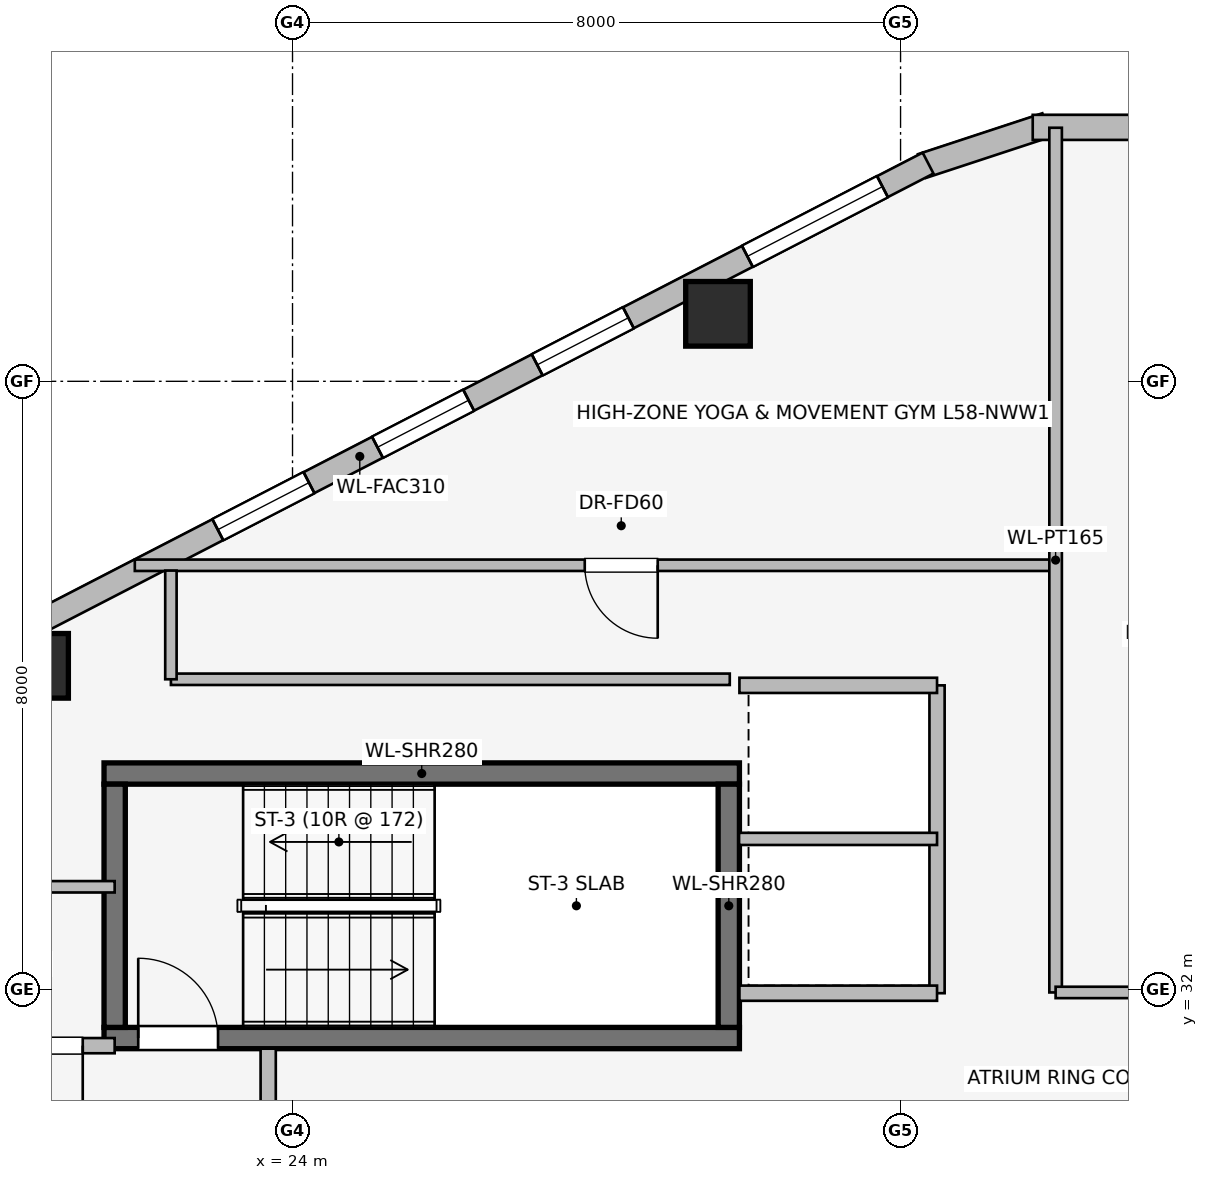
"""IFC4 building model, lengths in metres.
Left out: names, types, materials, properties, quantities, classifications, styles, units other than length and angle.
Written with IfcOpenShell. Run it as: python <this file> out.ifc"""

import sys

from ifc_helpers import new_model, si_unit, direction, frame, frame_2d, origin, origin_2d, place, context, subcontext, project, spatial, rectangle, extrude, element, fill, save


model = new_model("IFC4")
c1 = context("Model", 3, precision=1e-05, world=origin(), true_north=direction((0.0, 1.0)))
c2 = subcontext(c1, "Body", "Model", "MODEL_VIEW")
j1 = project(units=[si_unit("LENGTHUNIT", "METRE"), si_unit("PLANEANGLEUNIT", "RADIAN")], contexts=[c1])
p1 = place(None, origin())
s1 = spatial("IfcSite", under=j1, at=p1, CompositionType="ELEMENT")
p2 = place(p1, origin())
s2 = spatial("IfcBuilding", under=s1, at=p2, CompositionType="ELEMENT")
p3 = place(p2, frame((0.0, 0.0, 213.7)))
s3 = spatial("IfcBuildingStorey", under=s2, at=p3, CompositionType="ELEMENT", Elevation=213.7)
p4 = place(p3, frame((21.52, 31.36, 0.0), z_axis=(0.0, 0.0, 1.0), x_axis=(1.0, 0.0, 0.0)))
e1 = element("IfcWall", 1, at=p4, inside=s3, PredefinedType="SHEAR", context=c2, shape_type="SweptSolid", body=[
    extrude(rectangle(XDim=8.36, YDim=0.28, at=frame_2d((4.18, 0.0))), origin(), (0.0, 0.0, 1.0), 3.45),
])
p5 = place(p4, frame((0.45, 0.0, 0.0)))
e2 = element("IfcOpeningElement", 2, at=p5, cuts=e1, PredefinedType="OPENING", context=c2, shape_type="SweptSolid", body=[
    extrude(rectangle(XDim=1.05, YDim=2.0, at=frame_2d((0.525, 1.0))), frame((0.0, 0.15, 0.0), z_axis=(0.0, -1.0, 0.0), x_axis=(1.0, 0.0, 0.0)), (0.0, 0.0, 1.0), 0.3),
])
p6 = place(p3, frame((29.88, 34.84, 0.0), z_axis=(0.0, 0.0, 1.0), x_axis=(-1.0, 0.0, 0.0)))
e3 = element("IfcWall", 3, at=p6, inside=s3, PredefinedType="SHEAR", context=c2, shape_type="SweptSolid", body=[
    extrude(rectangle(XDim=8.36, YDim=0.28, at=frame_2d((4.18, 0.0))), origin(), (0.0, 0.0, 1.0), 3.45),
])
for number, where, z_axis, x_axis in (
    (4, (21.66, 34.7, 0.0), (0.0, 0.0, 1.0), (0.0, -1.0, 0.0)),
    (5, (29.74, 31.5, 0.0), (0.0, 0.0, 1.0), (0.0, 1.0, 0.0)),
):
    element("IfcWall", number, at=place(p3, frame(where, z_axis=z_axis, x_axis=x_axis)), inside=s3, PredefinedType="SHEAR", context=c2, shape_type="SweptSolid", body=[
        extrude(rectangle(XDim=3.2, YDim=0.28, at=frame_2d((1.6, 0.0))), origin(), (0.0, 0.0, 1.0), 3.45),
    ])
for number, where, z_axis, x_axis in (
    (6, (29.598, 40.888, 0.0), (0.0, 0.0, 1.0), (1.0, 0.0, 0.0)),
    (7, (20.626, 36.257, 0.0), (0.0, 0.0, 1.0), (1.0, 0.0, 0.0)),
):
    element("IfcColumn", number, at=place(p3, frame(where, z_axis=z_axis, x_axis=x_axis)), inside=s3, PredefinedType="COLUMN", context=c2, shape_type="SweptSolid", body=[
        extrude(rectangle(XDim=0.85, YDim=0.85, at=origin_2d()), origin(), (0.0, 0.0, 1.0), 3.45),
    ])
p7 = place(p3, frame((32.281, 42.832, 0.0), z_axis=(0.0, 0.0, 1.0), x_axis=(0.949937416267, 0.312440242569, 0.0)))
e8 = element("IfcWall", 8, at=p7, inside=s3, PredefinedType="STANDARD", context=c2, shape_type="SweptSolid", body=[
    extrude(rectangle(XDim=1.722, YDim=0.33, at=frame_2d((0.861, 0.0))), origin(), (0.0, 0.0, 1.0), 3.19),
])
p8 = place(p3, frame((33.739, 43.341, 0.0), z_axis=(0.0, 0.0, 1.0), x_axis=(1.0, 0.0, 0.0)))
e9 = element("IfcWall", 9, at=p8, inside=s3, PredefinedType="STANDARD", context=c2, shape_type="SweptSolid", body=[
    extrude(rectangle(XDim=1.722, YDim=0.33, at=frame_2d((0.861, 0.0))), origin(), (0.0, 0.0, 1.0), 3.19),
])
p9 = place(p3, frame((17.408, 35.153, 0.0), z_axis=(0.0, 0.0, 1.0), x_axis=(0.888626188278, 0.458632202867, 0.0)))
e10 = element("IfcWall", 10, at=p9, inside=s3, PredefinedType="STANDARD", context=c2, shape_type="SweptSolid", body=[
    extrude(rectangle(XDim=16.828, YDim=0.31, at=frame_2d((8.414, 0.0))), origin(), (0.0, 0.0, 1.0), 3.19),
])
p10 = place(p9, frame((0.675, 0.0, 0.75)))
e11 = element("IfcOpeningElement", 11, at=p10, cuts=e10, PredefinedType="OPENING", context=c2, shape_type="SweptSolid", body=[
    extrude(rectangle(XDim=2.0, YDim=1.5, at=frame_2d((1.0, 0.75))), frame((0.0, 0.165, 0.0), z_axis=(0.0, -1.0, 0.0), x_axis=(1.0, 0.0, 0.0)), (0.0, 0.0, 1.0), 0.33),
])
p11 = place(p9, frame((6.312, 0.0, 0.75)))
e12 = element("IfcOpeningElement", 12, at=p11, cuts=e10, PredefinedType="OPENING", context=c2, shape_type="SweptSolid", body=[
    extrude(rectangle(XDim=1.35, YDim=1.45, at=frame_2d((0.675, 0.725))), frame((0.0, 0.165, 0.0), z_axis=(0.0, -1.0, 0.0), x_axis=(1.0, 0.0, 0.0)), (0.0, 0.0, 1.0), 0.33),
])
p12 = place(p9, frame((8.676, 0.0, 0.75)))
e13 = element("IfcOpeningElement", 13, at=p12, cuts=e10, PredefinedType="OPENING", context=c2, shape_type="SweptSolid", body=[
    extrude(rectangle(XDim=1.35, YDim=1.45, at=frame_2d((0.675, 0.725))), frame((0.0, 0.165, 0.0), z_axis=(0.0, -1.0, 0.0), x_axis=(1.0, 0.0, 0.0)), (0.0, 0.0, 1.0), 0.33),
])
p13 = place(p9, frame((11.041, 0.0, 0.75)))
e14 = element("IfcOpeningElement", 14, at=p13, cuts=e10, PredefinedType="OPENING", context=c2, shape_type="SweptSolid", body=[
    extrude(rectangle(XDim=1.35, YDim=1.45, at=frame_2d((0.675, 0.725))), frame((0.0, 0.165, 0.0), z_axis=(0.0, -1.0, 0.0), x_axis=(1.0, 0.0, 0.0)), (0.0, 0.0, 1.0), 0.33),
])
p14 = place(p9, frame((14.153, 0.0, 0.75)))
e15 = element("IfcOpeningElement", 15, at=p14, cuts=e10, PredefinedType="OPENING", context=c2, shape_type="SweptSolid", body=[
    extrude(rectangle(XDim=2.0, YDim=1.5, at=frame_2d((1.0, 0.75))), frame((0.0, 0.165, 0.0), z_axis=(0.0, -1.0, 0.0), x_axis=(1.0, 0.0, 0.0)), (0.0, 0.0, 1.0), 0.33),
])
p15 = place(p3, frame((23.68, 25.68, 0.0), z_axis=(0.0, 0.0, 1.0), x_axis=(0.0, 1.0, 0.0)))
e16 = element("IfcWall", 16, at=p15, inside=s3, PredefinedType="PARTITIONING", context=c2, shape_type="SweptSolid", body=[
    extrude(rectangle(XDim=5.54, YDim=0.2, at=frame_2d((2.77, 0.0))), origin(), (0.0, 0.0, 1.0), 3.19),
])
p16 = place(p15, frame((1.8, 0.0, 0.0)))
e17 = element("IfcOpeningElement", 17, at=p16, cuts=e16, PredefinedType="OPENING", context=c2, shape_type="SweptSolid", body=[
    extrude(rectangle(XDim=1.05, YDim=2.0, at=frame_2d((0.525, 1.0))), frame((0.0, 0.11, 0.0), z_axis=(0.0, -1.0, 0.0), x_axis=(1.0, 0.0, 0.0)), (0.0, 0.0, 1.0), 0.22),
])
p17 = place(p3, frame((21.66, 31.26, 0.0), z_axis=(0.0, 0.0, 1.0), x_axis=(-1.0, 0.0, 0.0)))
e18 = element("IfcWall", 18, at=p17, inside=s3, PredefinedType="PARTITIONING", context=c2, shape_type="SweptSolid", body=[
    extrude(rectangle(XDim=2.01, YDim=0.2, at=frame_2d((1.005, 0.0))), origin(), (0.0, 0.0, 1.0), 3.19),
])
p18 = place(p17, frame((0.42, 0.0, 0.0)))
e19 = element("IfcOpeningElement", 19, at=p18, cuts=e18, PredefinedType="OPENING", context=c2, shape_type="SweptSolid", body=[
    extrude(rectangle(XDim=0.86, YDim=2.0, at=frame_2d((0.43, 1.0))), frame((0.0, 0.11, 0.0), z_axis=(0.0, -1.0, 0.0), x_axis=(1.0, 0.0, 0.0)), (0.0, 0.0, 1.0), 0.22),
])
p19 = place(p3, frame((32.48, 31.95, 0.0), z_axis=(0.0, 0.0, 1.0), x_axis=(0.0, 1.0, 0.0)))
e20 = element("IfcWall", 20, at=p19, inside=s3, PredefinedType="PARTITIONING", context=c2, shape_type="SweptSolid", body=[
    extrude(rectangle(XDim=4.05, YDim=0.2, at=frame_2d((2.025, 0.0))), origin(), (0.0, 0.0, 1.0), 3.19),
])
for number, where, z_axis, x_axis in (
    (21, (29.88, 36.0, 0.0), (0.0, 0.0, 1.0), (1.0, 0.0, 0.0)),
    (22, (32.48, 31.95, 0.0), (0.0, 0.0, 1.0), (-1.0, 0.0, 0.0)),
):
    element("IfcWall", number, at=place(p3, frame(where, z_axis=z_axis, x_axis=x_axis)), inside=s3, PredefinedType="PARTITIONING", context=c2, shape_type="SweptSolid", body=[
        extrude(rectangle(XDim=2.6, YDim=0.2, at=frame_2d((1.3, 0.0))), origin(), (0.0, 0.0, 1.0), 3.19),
    ])
p20 = place(p3, frame((29.875, 33.98, 0.0), z_axis=(0.0, 0.0, 1.0), x_axis=(1.0, 0.0, 0.0)))
e23 = element("IfcWall", 23, at=p20, inside=s3, PredefinedType="PARTITIONING", context=c2, shape_type="SweptSolid", body=[
    extrude(rectangle(XDim=2.605, YDim=0.16, at=frame_2d((1.302, 0.0))), origin(), (0.0, 0.0, 1.0), 2.582),
])
p21 = place(p3, frame((21.66, 33.35, 0.0), z_axis=(0.0, 0.0, 1.0), x_axis=(-1.0, 0.0, 0.0)))
e24 = element("IfcWall", 24, at=p21, inside=s3, PredefinedType="PARTITIONING", context=c2, shape_type="SweptSolid", body=[
    extrude(rectangle(XDim=2.56, YDim=0.15, at=frame_2d((1.28, 0.0))), origin(), (0.0, 0.0, 1.0), 3.19),
])
p22 = place(p3, frame((34.0, 37.58, 0.0), z_axis=(0.0, 0.0, 1.0), x_axis=(-1.0, 0.0, 0.0)))
e25 = element("IfcWall", 25, at=p22, inside=s3, PredefinedType="PARTITIONING", context=c2, shape_type="SweptSolid", body=[
    extrude(rectangle(XDim=12.075, YDim=0.15, at=frame_2d((6.038, 0.0))), origin(), (0.0, 0.0, 1.0), 2.582),
])
p23 = place(p22, frame((5.195, 0.0, 0.0)))
e26 = element("IfcOpeningElement", 26, at=p23, cuts=e25, PredefinedType="OPENING", context=c2, shape_type="SweptSolid", body=[
    extrude(rectangle(XDim=0.96, YDim=2.0, at=frame_2d((0.48, 1.0))), frame((0.0, 0.085, 0.0), z_axis=(0.0, -1.0, 0.0), x_axis=(1.0, 0.0, 0.0)), (0.0, 0.0, 1.0), 0.17),
])
p24 = place(p3, frame((34.04, 31.96, 0.0), z_axis=(0.0, 0.0, 1.0), x_axis=(0.0, 1.0, 0.0)))
e27 = element("IfcWall", 27, at=p24, inside=s3, PredefinedType="PARTITIONING", context=c2, shape_type="SweptSolid", body=[
    extrude(rectangle(XDim=11.376, YDim=0.165, at=frame_2d((5.688, 0.0))), origin(), (0.0, 0.0, 1.0), 3.19),
])
p25 = place(p3, frame((39.88, 31.96, 0.0), z_axis=(0.0, 0.0, 1.0), x_axis=(-1.0, 0.0, 0.0)))
e28 = element("IfcWall", 28, at=p25, inside=s3, PredefinedType="PARTITIONING", context=c2, shape_type="SweptSolid", body=[
    extrude(rectangle(XDim=5.84, YDim=0.15, at=frame_2d((2.92, 0.0))), origin(), (0.0, 0.0, 1.0), 3.19),
])
p26 = place(p25, frame((2.44, 0.0, 0.0)))
e29 = element("IfcOpeningElement", 29, at=p26, cuts=e28, PredefinedType="OPENING", context=c2, shape_type="SweptSolid", body=[
    extrude(rectangle(XDim=0.96, YDim=2.0, at=frame_2d((0.48, 1.0))), frame((0.0, 0.085, 0.0), z_axis=(0.0, -1.0, 0.0), x_axis=(1.0, 0.0, 0.0)), (0.0, 0.0, 1.0), 0.17),
])
p27 = place(p3, frame((29.753, 36.08, 0.0), z_axis=(0.0, 0.0, 1.0), x_axis=(-1.0, 0.0, 0.0)))
e30 = element("IfcWall", 30, at=p27, inside=s3, PredefinedType="PARTITIONING", context=c2, shape_type="SweptSolid", body=[
    extrude(rectangle(XDim=7.353, YDim=0.15, at=frame_2d((3.677, 0.0))), origin(), (0.0, 0.0, 1.0), 3.19),
])
p28 = place(p3, frame((22.4, 36.08, 0.0), z_axis=(0.0, 0.0, 1.0), x_axis=(0.0, 1.0, 0.0)))
e31 = element("IfcWall", 31, at=p28, inside=s3, PredefinedType="PARTITIONING", context=c2, shape_type="SweptSolid", body=[
    extrude(rectangle(XDim=1.43, YDim=0.15, at=frame_2d((0.715, 0.0))), origin(), (0.0, 0.0, 1.0), 3.19),
])
p29 = place(p11, origin())
e32 = element("IfcWindow", 32, at=p29, inside=s3, PartitioningType="SINGLE_PANEL", PredefinedType="WINDOW", context=c2, shape_type="SweptSolid", body=[
    extrude(rectangle(XDim=1.35, YDim=1.45, at=frame_2d((0.675, 0.725))), frame((0.0, 0.03, 0.0), z_axis=(0.0, -1.0, 0.0), x_axis=(1.0, 0.0, 0.0)), (0.0, 0.0, 1.0), 0.06),
])
fill(e12, e32)
p30 = place(p12, origin())
e33 = element("IfcWindow", 33, at=p30, inside=s3, PartitioningType="SINGLE_PANEL", PredefinedType="WINDOW", context=c2, shape_type="SweptSolid", body=[
    extrude(rectangle(XDim=1.35, YDim=1.45, at=frame_2d((0.675, 0.725))), frame((0.0, 0.03, 0.0), z_axis=(0.0, -1.0, 0.0), x_axis=(1.0, 0.0, 0.0)), (0.0, 0.0, 1.0), 0.06),
])
fill(e13, e33)
p31 = place(p13, origin())
e34 = element("IfcWindow", 34, at=p31, inside=s3, PartitioningType="SINGLE_PANEL", PredefinedType="WINDOW", context=c2, shape_type="SweptSolid", body=[
    extrude(rectangle(XDim=1.35, YDim=1.45, at=frame_2d((0.675, 0.725))), frame((0.0, 0.03, 0.0), z_axis=(0.0, -1.0, 0.0), x_axis=(1.0, 0.0, 0.0)), (0.0, 0.0, 1.0), 0.06),
])
fill(e14, e34)
p32 = place(p14, origin())
e35 = element("IfcWindow", 35, at=p32, inside=s3, PartitioningType="SINGLE_PANEL", PredefinedType="WINDOW", context=c2, shape_type="SweptSolid", body=[
    extrude(rectangle(XDim=2.0, YDim=1.5, at=frame_2d((1.0, 0.75))), frame((0.0, 0.03, 0.0), z_axis=(0.0, -1.0, 0.0), x_axis=(1.0, 0.0, 0.0)), (0.0, 0.0, 1.0), 0.06),
])
fill(e15, e35)
p33 = place(p5, origin())
e36 = element("IfcDoor", 36, at=p33, inside=s3, OperationType="SINGLE_SWING_LEFT", PredefinedType="DOOR", context=c2, shape_type="SweptSolid", body=[
    extrude(rectangle(XDim=1.05, YDim=2.0, at=frame_2d((0.525, 1.0))), frame((0.0, 0.025, 0.0), z_axis=(0.0, -1.0, 0.0), x_axis=(1.0, 0.0, 0.0)), (0.0, 0.0, 1.0), 0.05),
])
fill(e2, e36)
p34 = place(p18, origin())
e37 = element("IfcDoor", 37, at=p34, inside=s3, OperationType="SINGLE_SWING_LEFT", PredefinedType="DOOR", context=c2, shape_type="SweptSolid", body=[
    extrude(rectangle(XDim=0.86, YDim=2.0, at=frame_2d((0.43, 1.0))), frame((0.0, 0.025, 0.0), z_axis=(0.0, -1.0, 0.0), x_axis=(1.0, 0.0, 0.0)), (0.0, 0.0, 1.0), 0.05),
])
fill(e19, e37)
p35 = place(p23, origin())
e38 = element("IfcDoor", 38, at=p35, inside=s3, OperationType="SINGLE_SWING_LEFT", PredefinedType="DOOR", context=c2, shape_type="SweptSolid", body=[
    extrude(rectangle(XDim=0.96, YDim=2.0, at=frame_2d((0.48, 1.0))), frame((0.0, 0.025, 0.0), z_axis=(0.0, -1.0, 0.0), x_axis=(1.0, 0.0, 0.0)), (0.0, 0.0, 1.0), 0.05),
])
fill(e26, e38)
save(model, sys.argv[1])
